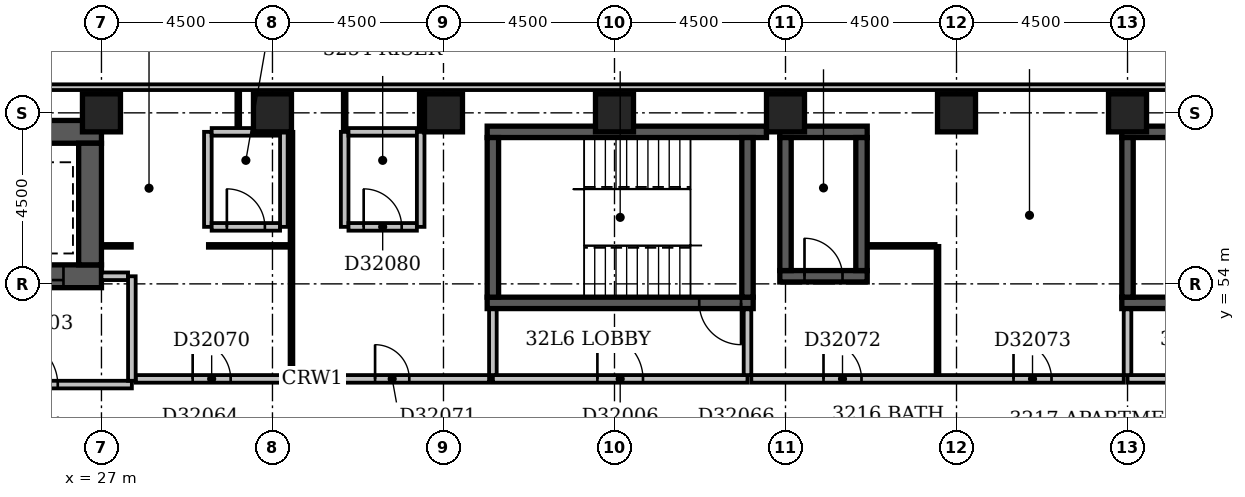
"""IFC4 building model, lengths in metres.
Left out: names, types, materials, properties, quantities, classifications, styles, units other than length and angle.
Written with IfcOpenShell. Run it as: python <this file> out.ifc"""

import sys

from ifc_helpers import new_model, si_unit, direction, frame, frame_2d, origin, origin_2d, place, context, subcontext, project, spatial, rectangle, extrude, element, fill, save


model = new_model("IFC4")
c1 = context("Model", 3, precision=1e-05, world=origin(), true_north=direction((0.0, 1.0)))
c2 = subcontext(c1, "Body", "Model", "MODEL_VIEW")
j1 = project(units=[si_unit("LENGTHUNIT", "METRE"), si_unit("PLANEANGLEUNIT", "RADIAN")], contexts=[c1])
p1 = place(None, origin())
s1 = spatial("IfcSite", under=j1, at=p1, CompositionType="ELEMENT")
p2 = place(p1, origin())
s2 = spatial("IfcBuilding", under=s1, at=p2, CompositionType="ELEMENT")
p3 = place(p2, frame((0.0, 0.0, 130.4)))
s3 = spatial("IfcBuildingStorey", under=s2, at=p3, CompositionType="ELEMENT", Elevation=130.4)
p4 = place(p3, frame((23.9, 54.2, -0.3), z_axis=(0.0, 0.0, 1.0), x_axis=(1.0, 0.0, 0.0)))
e1 = element("IfcWall", 1, at=p4, inside=s3, PredefinedType="SHEAR", context=c2, shape_type="SweptSolid", body=[
    extrude(rectangle(XDim=3.1, YDim=0.6, at=frame_2d((1.55, 0.0))), origin(), (0.0, 0.0, 1.0), 3.6),
])
p5 = place(p4, frame((1.0, 0.0, 0.3)))
e2 = element("IfcOpeningElement", 2, at=p5, cuts=e1, PredefinedType="OPENING", context=c2, shape_type="SweptSolid", body=[
    extrude(rectangle(XDim=1.1, YDim=2.1, at=frame_2d((0.55, 1.05))), frame((0.0, 0.312, 0.0), z_axis=(0.0, -1.0, 0.0), x_axis=(1.0, 0.0, 0.0)), (0.0, 0.0, 1.0), 0.624),
])
p6 = place(p3, frame((23.9, 58.0, -0.3), z_axis=(0.0, 0.0, 1.0), x_axis=(1.0, 0.0, 0.0)))
e3 = element("IfcWall", 3, at=p6, inside=s3, PredefinedType="SHEAR", context=c2, shape_type="SweptSolid", body=[
    extrude(rectangle(XDim=3.1, YDim=0.6, at=frame_2d((1.55, 0.0))), origin(), (0.0, 0.0, 1.0), 3.6),
])
p7 = place(p3, frame((26.7, 54.5, -0.3), z_axis=(0.0, 0.0, 1.0), x_axis=(0.0, 1.0, 0.0)))
e4 = element("IfcWall", 4, at=p7, inside=s3, PredefinedType="SHEAR", context=c2, shape_type="SweptSolid", body=[
    extrude(rectangle(XDim=3.2, YDim=0.6, at=frame_2d((1.6, 0.0))), origin(), (0.0, 0.0, 1.0), 3.6),
])
p8 = place(p3, frame((37.15, 53.5, -0.3), z_axis=(0.0, 0.0, 1.0), x_axis=(1.0, 0.0, 0.0)))
e5 = element("IfcWall", 5, at=p8, inside=s3, PredefinedType="SHEAR", context=c2, shape_type="SweptSolid", body=[
    extrude(rectangle(XDim=7.0, YDim=0.3, at=frame_2d((3.5, 0.0))), origin(), (0.0, 0.0, 1.0), 3.6),
])
p9 = place(p8, frame((5.58, 0.0, 0.3)))
e6 = element("IfcOpeningElement", 6, at=p9, cuts=e5, PredefinedType="OPENING", context=c2, shape_type="SweptSolid", body=[
    extrude(rectangle(XDim=1.1, YDim=2.1, at=frame_2d((0.55, 1.05))), frame((0.0, 0.162, 0.0), z_axis=(0.0, -1.0, 0.0), x_axis=(1.0, 0.0, 0.0)), (0.0, 0.0, 1.0), 0.324),
])
p10 = place(p3, frame((37.15, 58.0, -0.3), z_axis=(0.0, 0.0, 1.0), x_axis=(1.0, 0.0, 0.0)))
e7 = element("IfcWall", 7, at=p10, inside=s3, PredefinedType="SHEAR", context=c2, shape_type="SweptSolid", body=[
    extrude(rectangle(XDim=7.35, YDim=0.3, at=frame_2d((3.675, 0.0))), origin(), (0.0, 0.0, 1.0), 3.6),
])
for number, where, z_axis, x_axis in (
    (8, (37.3, 53.65, -0.3), (0.0, 0.0, 1.0), (0.0, 1.0, 0.0)),
    (9, (44.0, 53.65, -0.3), (0.0, 0.0, 1.0), (0.0, 1.0, 0.0)),
):
    element("IfcWall", number, at=place(p3, frame(where, z_axis=z_axis, x_axis=x_axis)), inside=s3, PredefinedType="SHEAR", context=c2, shape_type="SweptSolid", body=[
        extrude(rectangle(XDim=4.2, YDim=0.3, at=frame_2d((2.1, 0.0))), origin(), (0.0, 0.0, 1.0), 3.6),
    ])
p11 = place(p3, frame((44.85, 54.2, -0.3), z_axis=(0.0, 0.0, 1.0), x_axis=(1.0, 0.0, 0.0)))
e10 = element("IfcWall", 10, at=p11, inside=s3, PredefinedType="SHEAR", context=c2, shape_type="SweptSolid", body=[
    extrude(rectangle(XDim=2.3, YDim=0.3, at=frame_2d((1.15, 0.0))), origin(), (0.0, 0.0, 1.0), 3.6),
])
p12 = place(p11, frame((0.65, 0.0, 0.3)))
e11 = element("IfcOpeningElement", 11, at=p12, cuts=e10, PredefinedType="OPENING", context=c2, shape_type="SweptSolid", body=[
    extrude(rectangle(XDim=1.0, YDim=2.1, at=frame_2d((0.5, 1.05))), frame((0.0, 0.162, 0.0), z_axis=(0.0, -1.0, 0.0), x_axis=(1.0, 0.0, 0.0)), (0.0, 0.0, 1.0), 0.324),
])
p13 = place(p3, frame((44.85, 58.0, -0.3), z_axis=(0.0, 0.0, 1.0), x_axis=(1.0, 0.0, 0.0)))
e12 = element("IfcWall", 12, at=p13, inside=s3, PredefinedType="SHEAR", context=c2, shape_type="SweptSolid", body=[
    extrude(rectangle(XDim=2.3, YDim=0.3, at=frame_2d((1.15, 0.0))), origin(), (0.0, 0.0, 1.0), 3.6),
])
for number, where, z_axis, x_axis in (
    (13, (45.0, 54.35, -0.3), (0.0, 0.0, 1.0), (0.0, 1.0, 0.0)),
    (14, (47.0, 54.35, -0.3), (0.0, 0.0, 1.0), (0.0, 1.0, 0.0)),
):
    element("IfcWall", number, at=place(p3, frame(where, z_axis=z_axis, x_axis=x_axis)), inside=s3, PredefinedType="SHEAR", context=c2, shape_type="SweptSolid", body=[
        extrude(rectangle(XDim=3.5, YDim=0.3, at=frame_2d((1.75, 0.0))), origin(), (0.0, 0.0, 1.0), 3.6),
    ])
p14 = place(p3, frame((53.85, 53.5, -0.3), z_axis=(0.0, 0.0, 1.0), x_axis=(1.0, 0.0, 0.0)))
e15 = element("IfcWall", 15, at=p14, inside=s3, PredefinedType="SHEAR", context=c2, shape_type="SweptSolid", body=[
    extrude(rectangle(XDim=7.0, YDim=0.3, at=frame_2d((3.5, 0.0))), origin(), (0.0, 0.0, 1.0), 3.6),
])
p15 = place(p14, frame((5.58, 0.0, 0.3)))
e16 = element("IfcOpeningElement", 16, at=p15, cuts=e15, PredefinedType="OPENING", context=c2, shape_type="SweptSolid", body=[
    extrude(rectangle(XDim=1.1, YDim=2.1, at=frame_2d((0.55, 1.05))), frame((0.0, 0.162, 0.0), z_axis=(0.0, -1.0, 0.0), x_axis=(1.0, 0.0, 0.0)), (0.0, 0.0, 1.0), 0.324),
])
p16 = place(p3, frame((53.85, 58.0, -0.3), z_axis=(0.0, 0.0, 1.0), x_axis=(1.0, 0.0, 0.0)))
e17 = element("IfcWall", 17, at=p16, inside=s3, PredefinedType="SHEAR", context=c2, shape_type="SweptSolid", body=[
    extrude(rectangle(XDim=7.0, YDim=0.3, at=frame_2d((3.5, 0.0))), origin(), (0.0, 0.0, 1.0), 3.6),
])
p17 = place(p3, frame((54.0, 53.65, -0.3), z_axis=(0.0, 0.0, 1.0), x_axis=(0.0, 1.0, 0.0)))
e18 = element("IfcWall", 18, at=p17, inside=s3, PredefinedType="SHEAR", context=c2, shape_type="SweptSolid", body=[
    extrude(rectangle(XDim=4.2, YDim=0.3, at=frame_2d((2.1, 0.0))), origin(), (0.0, 0.0, 1.0), 3.6),
])
for number, where, z_axis, x_axis in (
    (19, (27.0, 58.5, -0.3), (0.0, 0.0, 1.0), (1.0, 0.0, 0.0)),
    (20, (31.5, 58.5, -0.3), (0.0, 0.0, 1.0), (1.0, 0.0, 0.0)),
    (21, (36.0, 58.5, -0.3), (0.0, 0.0, 1.0), (1.0, 0.0, 0.0)),
    (22, (40.5, 58.5, -0.3), (0.0, 0.0, 1.0), (1.0, 0.0, 0.0)),
    (23, (45.0, 58.5, -0.3), (0.0, 0.0, 1.0), (1.0, 0.0, 0.0)),
    (24, (49.5, 58.5, -0.3), (0.0, 0.0, 1.0), (1.0, 0.0, 0.0)),
    (25, (54.0, 58.5, -0.3), (0.0, 0.0, 1.0), (1.0, 0.0, 0.0)),
):
    element("IfcColumn", number, at=place(p3, frame(where, z_axis=z_axis, x_axis=x_axis)), inside=s3, PredefinedType="COLUMN", context=c2, shape_type="SweptSolid", body=[
        extrude(rectangle(XDim=1.0, YDim=1.0, at=origin_2d()), origin(), (0.0, 0.0, 1.0), 3.6),
    ])
p18 = place(p3, frame((68.1, 59.175, 0.0), z_axis=(0.0, 0.0, 1.0), x_axis=(-1.0, 0.0, 0.0)))
e26 = element("IfcWall", 26, at=p18, inside=s3, PredefinedType="STANDARD", context=c2, shape_type="SweptSolid", body=[
    extrude(rectangle(XDim=68.85, YDim=0.15, at=frame_2d((34.425, 0.0))), origin(), (0.0, 0.0, 1.0), 2.7),
])
p19 = place(p3, frame((23.0, 51.35, 0.0), z_axis=(0.0, 0.0, 1.0), x_axis=(1.0, 0.0, 0.0)))
e27 = element("IfcWall", 27, at=p19, inside=s3, PredefinedType="PARTITIONING", context=c2, shape_type="SweptSolid", body=[
    extrude(rectangle(XDim=4.8, YDim=0.2, at=frame_2d((2.4, 0.0))), origin(), (0.0, 0.0, 1.0), 3.3),
])
p20 = place(p19, frame((1.65, 0.0, 0.0)))
e28 = element("IfcOpeningElement", 28, at=p20, cuts=e27, PredefinedType="OPENING", context=c2, shape_type="SweptSolid", body=[
    extrude(rectangle(XDim=1.2, YDim=2.1, at=frame_2d((0.6, 1.05))), frame((0.0, 0.112, 0.0), z_axis=(0.0, -1.0, 0.0), x_axis=(1.0, 0.0, 0.0)), (0.0, 0.0, 1.0), 0.224),
])
p21 = place(p3, frame((27.8, 51.45, 0.0), z_axis=(0.0, 0.0, 1.0), x_axis=(0.0, 1.0, 0.0)))
e29 = element("IfcWall", 29, at=p21, inside=s3, PredefinedType="PARTITIONING", context=c2, shape_type="SweptSolid", body=[
    extrude(rectangle(XDim=2.75, YDim=0.2, at=frame_2d((1.375, 0.0))), origin(), (0.0, 0.0, 1.0), 3.3),
])
p22 = place(p3, frame((27.0, 54.2, 0.0), z_axis=(0.0, 0.0, 1.0), x_axis=(1.0, 0.0, 0.0)))
e30 = element("IfcWall", 30, at=p22, inside=s3, PredefinedType="PARTITIONING", context=c2, shape_type="SweptSolid", body=[
    extrude(rectangle(XDim=0.7, YDim=0.2, at=frame_2d((0.35, 0.0))), origin(), (0.0, 0.0, 1.0), 3.3),
])
p23 = place(p3, frame((37.3, 51.5, 0.0), z_axis=(0.0, 0.0, 1.0), x_axis=(1.0, 0.0, 0.0)))
e31 = element("IfcWall", 31, at=p23, inside=s3, PredefinedType="PARTITIONING", context=c2, shape_type="SweptSolid", body=[
    extrude(rectangle(XDim=6.7, YDim=0.2, at=frame_2d((3.35, 0.0))), origin(), (0.0, 0.0, 1.0), 3.3),
])
p24 = place(p23, frame((2.75, 0.0, 0.0)))
e32 = element("IfcOpeningElement", 32, at=p24, cuts=e31, PredefinedType="OPENING", context=c2, shape_type="SweptSolid", body=[
    extrude(rectangle(XDim=1.2, YDim=2.1, at=frame_2d((0.6, 1.05))), frame((0.0, 0.112, 0.0), z_axis=(0.0, -1.0, 0.0), x_axis=(1.0, 0.0, 0.0)), (0.0, 0.0, 1.0), 0.224),
])
for number, where, z_axis, x_axis in (
    (33, (44.0, 51.6, 0.0), (0.0, 0.0, 1.0), (0.0, 1.0, 0.0)),
    (34, (37.3, 51.6, 0.0), (0.0, 0.0, 1.0), (0.0, 1.0, 0.0)),
):
    element("IfcWall", number, at=place(p3, frame(where, z_axis=z_axis, x_axis=x_axis)), inside=s3, PredefinedType="PARTITIONING", context=c2, shape_type="SweptSolid", body=[
        extrude(rectangle(XDim=1.73, YDim=0.2, at=frame_2d((0.865, 0.0))), origin(), (0.0, 0.0, 1.0), 3.3),
    ])
p25 = place(p3, frame((54.0, 51.5, 0.0), z_axis=(0.0, 0.0, 1.0), x_axis=(1.0, 0.0, 0.0)))
e35 = element("IfcWall", 35, at=p25, inside=s3, PredefinedType="PARTITIONING", context=c2, shape_type="SweptSolid", body=[
    extrude(rectangle(XDim=6.7, YDim=0.2, at=frame_2d((3.35, 0.0))), origin(), (0.0, 0.0, 1.0), 3.3),
])
p26 = place(p25, frame((2.75, 0.0, 0.0)))
e36 = element("IfcOpeningElement", 36, at=p26, cuts=e35, PredefinedType="OPENING", context=c2, shape_type="SweptSolid", body=[
    extrude(rectangle(XDim=1.2, YDim=2.1, at=frame_2d((0.6, 1.05))), frame((0.0, 0.112, 0.0), z_axis=(0.0, -1.0, 0.0), x_axis=(1.0, 0.0, 0.0)), (0.0, 0.0, 1.0), 0.224),
])
p27 = place(p3, frame((54.0, 51.6, 0.0), z_axis=(0.0, 0.0, 1.0), x_axis=(0.0, 1.0, 0.0)))
e37 = element("IfcWall", 37, at=p27, inside=s3, PredefinedType="PARTITIONING", context=c2, shape_type="SweptSolid", body=[
    extrude(rectangle(XDim=1.73, YDim=0.2, at=frame_2d((0.865, 0.0))), origin(), (0.0, 0.0, 1.0), 2.6),
])
p28 = place(p3, frame((27.9, 51.5, 0.0), z_axis=(0.0, 0.0, 1.0), x_axis=(1.0, 0.0, 0.0)))
e38 = element("IfcWall", 38, at=p28, inside=s3, PredefinedType="PARTITIONING", context=c2, shape_type="SweptSolid", body=[
    extrude(rectangle(XDim=9.3, YDim=0.2, at=frame_2d((4.65, 0.0))), origin(), (0.0, 0.0, 1.0), 3.3),
])
p29 = place(p28, frame((1.5, 0.0, 0.0)))
e39 = element("IfcOpeningElement", 39, at=p29, cuts=e38, PredefinedType="OPENING", context=c2, shape_type="SweptSolid", body=[
    extrude(rectangle(XDim=1.0, YDim=2.1, at=frame_2d((0.5, 1.05))), frame((0.0, 0.112, 0.0), z_axis=(0.0, -1.0, 0.0), x_axis=(1.0, 0.0, 0.0)), (0.0, 0.0, 1.0), 0.224),
])
p30 = place(p28, frame((6.3, 0.0, 0.0)))
e40 = element("IfcOpeningElement", 40, at=p30, cuts=e38, PredefinedType="OPENING", context=c2, shape_type="SweptSolid", body=[
    extrude(rectangle(XDim=0.9, YDim=2.1, at=frame_2d((0.45, 1.05))), frame((0.0, 0.112, 0.0), z_axis=(0.0, -1.0, 0.0), x_axis=(1.0, 0.0, 0.0)), (0.0, 0.0, 1.0), 0.224),
])
p31 = place(p3, frame((44.1, 51.5, 0.0), z_axis=(0.0, 0.0, 1.0), x_axis=(1.0, 0.0, 0.0)))
e41 = element("IfcWall", 41, at=p31, inside=s3, PredefinedType="PARTITIONING", context=c2, shape_type="SweptSolid", body=[
    extrude(rectangle(XDim=9.8, YDim=0.2, at=frame_2d((4.9, 0.0))), origin(), (0.0, 0.0, 1.0), 3.3),
])
p32 = place(p31, frame((1.9, 0.0, 0.0)))
e42 = element("IfcOpeningElement", 42, at=p32, cuts=e41, PredefinedType="OPENING", context=c2, shape_type="SweptSolid", body=[
    extrude(rectangle(XDim=1.0, YDim=2.1, at=frame_2d((0.5, 1.05))), frame((0.0, 0.112, 0.0), z_axis=(0.0, -1.0, 0.0), x_axis=(1.0, 0.0, 0.0)), (0.0, 0.0, 1.0), 0.224),
])
p33 = place(p31, frame((6.9, 0.0, 0.0)))
e43 = element("IfcOpeningElement", 43, at=p33, cuts=e41, PredefinedType="OPENING", context=c2, shape_type="SweptSolid", body=[
    extrude(rectangle(XDim=1.0, YDim=2.1, at=frame_2d((0.5, 1.05))), frame((0.0, 0.112, 0.0), z_axis=(0.0, -1.0, 0.0), x_axis=(1.0, 0.0, 0.0)), (0.0, 0.0, 1.0), 0.224),
])
p34 = place(p3, frame((32.0, 51.6, 0.0), z_axis=(0.0, 0.0, 1.0), x_axis=(0.0, 1.0, 0.0)))
e44 = element("IfcWall", 44, at=p34, inside=s3, PredefinedType="PARTITIONING", context=c2, shape_type="SweptSolid", body=[
    extrude(rectangle(XDim=6.4, YDim=0.1, at=frame_2d((3.2, 0.0))), origin(), (0.0, 0.0, 1.0), 3.3),
])
p35 = place(p3, frame((49.0, 51.6, 0.0), z_axis=(0.0, 0.0, 1.0), x_axis=(0.0, 1.0, 0.0)))
e45 = element("IfcWall", 45, at=p35, inside=s3, PredefinedType="PARTITIONING", context=c2, shape_type="SweptSolid", body=[
    extrude(rectangle(XDim=3.4, YDim=0.1, at=frame_2d((1.7, 0.0))), origin(), (0.0, 0.0, 1.0), 3.3),
])
p36 = place(p3, frame((27.0, 55.0, 0.0), z_axis=(0.0, 0.0, 1.0), x_axis=(1.0, 0.0, 0.0)))
e46 = element("IfcWall", 46, at=p36, inside=s3, PredefinedType="PARTITIONING", context=c2, shape_type="SweptSolid", body=[
    extrude(rectangle(XDim=0.8, YDim=0.1, at=frame_2d((0.4, 0.0))), origin(), (0.0, 0.0, 1.0), 3.3),
])
p37 = place(p3, frame((29.8, 55.0, 0.0), z_axis=(0.0, 0.0, 1.0), x_axis=(1.0, 0.0, 0.0)))
e47 = element("IfcWall", 47, at=p37, inside=s3, PredefinedType="PARTITIONING", context=c2, shape_type="SweptSolid", body=[
    extrude(rectangle(XDim=2.15, YDim=0.1, at=frame_2d((1.075, 0.0))), origin(), (0.0, 0.0, 1.0), 3.3),
])
p38 = place(p3, frame((47.15, 55.0, 0.0), z_axis=(0.0, 0.0, 1.0), x_axis=(1.0, 0.0, 0.0)))
e48 = element("IfcWall", 48, at=p38, inside=s3, PredefinedType="PARTITIONING", context=c2, shape_type="SweptSolid", body=[
    extrude(rectangle(XDim=1.8, YDim=0.1, at=frame_2d((0.9, 0.0))), origin(), (0.0, 0.0, 1.0), 3.3),
])
p39 = place(p3, frame((29.8, 55.5, 0.0), z_axis=(0.0, 0.0, 1.0), x_axis=(0.0, 1.0, 0.0)))
e49 = element("IfcWall", 49, at=p39, inside=s3, PredefinedType="PARTITIONING", context=c2, shape_type="SweptSolid", body=[
    extrude(rectangle(XDim=2.5, YDim=0.2, at=frame_2d((1.25, 0.0))), origin(), (0.0, 0.0, 1.0), 3.3),
])
p40 = place(p3, frame((29.9, 55.5, 0.0), z_axis=(0.0, 0.0, 1.0), x_axis=(1.0, 0.0, 0.0)))
e50 = element("IfcWall", 50, at=p40, inside=s3, PredefinedType="PARTITIONING", context=c2, shape_type="SweptSolid", body=[
    extrude(rectangle(XDim=1.8, YDim=0.2, at=frame_2d((0.9, 0.0))), origin(), (0.0, 0.0, 1.0), 3.3),
])
p41 = place(p40, frame((0.4, 0.0, 0.0)))
e51 = element("IfcOpeningElement", 51, at=p41, cuts=e50, PredefinedType="OPENING", context=c2, shape_type="SweptSolid", body=[
    extrude(rectangle(XDim=1.0, YDim=2.1, at=frame_2d((0.5, 1.05))), frame((0.0, 0.112, 0.0), z_axis=(0.0, -1.0, 0.0), x_axis=(1.0, 0.0, 0.0)), (0.0, 0.0, 1.0), 0.224),
])
for number, where, z_axis, x_axis in (
    (52, (31.8, 55.5, 0.0), (0.0, 0.0, 1.0), (0.0, 1.0, 0.0)),
    (53, (33.4, 55.5, 0.0), (0.0, 0.0, 1.0), (0.0, 1.0, 0.0)),
):
    element("IfcWall", number, at=place(p3, frame(where, z_axis=z_axis, x_axis=x_axis)), inside=s3, PredefinedType="PARTITIONING", context=c2, shape_type="SweptSolid", body=[
        extrude(rectangle(XDim=2.5, YDim=0.2, at=frame_2d((1.25, 0.0))), origin(), (0.0, 0.0, 1.0), 3.3),
    ])
p42 = place(p3, frame((33.5, 55.5, 0.0), z_axis=(0.0, 0.0, 1.0), x_axis=(1.0, 0.0, 0.0)))
e54 = element("IfcWall", 54, at=p42, inside=s3, PredefinedType="PARTITIONING", context=c2, shape_type="SweptSolid", body=[
    extrude(rectangle(XDim=1.8, YDim=0.2, at=frame_2d((0.9, 0.0))), origin(), (0.0, 0.0, 1.0), 3.3),
])
p43 = place(p42, frame((0.4, 0.0, 0.0)))
e55 = element("IfcOpeningElement", 55, at=p43, cuts=e54, PredefinedType="OPENING", context=c2, shape_type="SweptSolid", body=[
    extrude(rectangle(XDim=1.0, YDim=2.1, at=frame_2d((0.5, 1.05))), frame((0.0, 0.112, 0.0), z_axis=(0.0, -1.0, 0.0), x_axis=(1.0, 0.0, 0.0)), (0.0, 0.0, 1.0), 0.224),
])
p44 = place(p3, frame((35.4, 55.5, 0.0), z_axis=(0.0, 0.0, 1.0), x_axis=(0.0, 1.0, 0.0)))
e56 = element("IfcWall", 56, at=p44, inside=s3, PredefinedType="PARTITIONING", context=c2, shape_type="SweptSolid", body=[
    extrude(rectangle(XDim=2.5, YDim=0.2, at=frame_2d((1.25, 0.0))), origin(), (0.0, 0.0, 1.0), 2.4),
])
p45 = place(p3, frame((29.9, 58.0, 0.0), z_axis=(0.0, 0.0, 1.0), x_axis=(1.0, 0.0, 0.0)))
e57 = element("IfcWall", 57, at=p45, inside=s3, PredefinedType="PARTITIONING", context=c2, shape_type="SweptSolid", body=[
    extrude(rectangle(XDim=1.8, YDim=0.2, at=frame_2d((0.9, 0.0))), origin(), (0.0, 0.0, 1.0), 3.3),
])
p46 = place(p3, frame((33.4, 58.0, 0.0), z_axis=(0.0, 0.0, 1.0), x_axis=(0.0, 1.0, 0.0)))
e58 = element("IfcWall", 58, at=p46, inside=s3, PredefinedType="PARTITIONING", context=c2, shape_type="SweptSolid", body=[
    extrude(rectangle(XDim=1.1, YDim=0.1, at=frame_2d((0.55, 0.0))), origin(), (0.0, 0.0, 1.0), 3.3),
])
p47 = place(p3, frame((33.5, 58.0, 0.0), z_axis=(0.0, 0.0, 1.0), x_axis=(1.0, 0.0, 0.0)))
e59 = element("IfcWall", 59, at=p47, inside=s3, PredefinedType="PARTITIONING", context=c2, shape_type="SweptSolid", body=[
    extrude(rectangle(XDim=1.8, YDim=0.2, at=frame_2d((0.9, 0.0))), origin(), (0.0, 0.0, 1.0), 3.3),
])
p48 = place(p3, frame((35.4, 58.0, 0.0), z_axis=(0.0, 0.0, 1.0), x_axis=(0.0, 1.0, 0.0)))
e60 = element("IfcWall", 60, at=p48, inside=s3, PredefinedType="PARTITIONING", context=c2, shape_type="SweptSolid", body=[
    extrude(rectangle(XDim=1.1, YDim=0.1, at=frame_2d((0.55, 0.0))), origin(), (0.0, 0.0, 1.0), 2.4),
])
p49 = place(p3, frame((30.6, 58.1, 0.0), z_axis=(0.0, 0.0, 1.0), x_axis=(0.0, 1.0, 0.0)))
e61 = element("IfcWall", 61, at=p49, inside=s3, PredefinedType="PARTITIONING", context=c2, shape_type="SweptSolid", body=[
    extrude(rectangle(XDim=1.0, YDim=0.1, at=frame_2d((0.5, 0.0))), origin(), (0.0, 0.0, 1.0), 3.3),
])
p50 = place(p20, origin())
e62 = element("IfcDoor", 62, at=p50, inside=s3, OperationType="SINGLE_SWING_LEFT", PredefinedType="DOOR", context=c2, shape_type="SweptSolid", body=[
    extrude(rectangle(XDim=1.2, YDim=2.1, at=frame_2d((0.6, 1.05))), frame((0.0, 0.025, 0.0), z_axis=(0.0, -1.0, 0.0), x_axis=(1.0, 0.0, 0.0)), (0.0, 0.0, 1.0), 0.05),
])
fill(e28, e62)
p51 = place(p5, origin())
e63 = element("IfcDoor", 63, at=p51, inside=s3, OperationType="SLIDING_TO_LEFT", PredefinedType="DOOR", context=c2, shape_type="SweptSolid", body=[
    extrude(rectangle(XDim=1.1, YDim=2.1, at=frame_2d((0.55, 1.05))), frame((0.0, 0.025, 0.0), z_axis=(0.0, -1.0, 0.0), x_axis=(1.0, 0.0, 0.0)), (0.0, 0.0, 1.0), 0.05),
])
fill(e2, e63)
p52 = place(p24, origin())
e64 = element("IfcDoor", 64, at=p52, inside=s3, OperationType="SINGLE_SWING_LEFT", PredefinedType="DOOR", context=c2, shape_type="SweptSolid", body=[
    extrude(rectangle(XDim=1.2, YDim=2.1, at=frame_2d((0.6, 1.05))), frame((0.0, 0.025, 0.0), z_axis=(0.0, -1.0, 0.0), x_axis=(1.0, 0.0, 0.0)), (0.0, 0.0, 1.0), 0.05),
])
fill(e32, e64)
p53 = place(p12, origin())
e65 = element("IfcDoor", 65, at=p53, inside=s3, OperationType="SINGLE_SWING_LEFT", PredefinedType="DOOR", context=c2, shape_type="SweptSolid", body=[
    extrude(rectangle(XDim=1.0, YDim=2.1, at=frame_2d((0.5, 1.05))), frame((0.0, 0.025, 0.0), z_axis=(0.0, -1.0, 0.0), x_axis=(1.0, 0.0, 0.0)), (0.0, 0.0, 1.0), 0.05),
])
fill(e11, e65)
p54 = place(p9, origin())
e66 = element("IfcDoor", 66, at=p54, inside=s3, OperationType="SINGLE_SWING_RIGHT", PredefinedType="DOOR", context=c2, shape_type="SweptSolid", body=[
    extrude(rectangle(XDim=1.1, YDim=2.1, at=frame_2d((0.55, 1.05))), frame((0.0, 0.025, 0.0), z_axis=(0.0, -1.0, 0.0), x_axis=(1.0, 0.0, 0.0)), (0.0, 0.0, 1.0), 0.05),
])
fill(e6, e66)
p55 = place(p29, origin())
e67 = element("IfcDoor", 67, at=p55, inside=s3, OperationType="SINGLE_SWING_LEFT", PredefinedType="DOOR", context=c2, shape_type="SweptSolid", body=[
    extrude(rectangle(XDim=1.0, YDim=2.1, at=frame_2d((0.5, 1.05))), frame((0.0, 0.025, 0.0), z_axis=(0.0, -1.0, 0.0), x_axis=(1.0, 0.0, 0.0)), (0.0, 0.0, 1.0), 0.05),
])
fill(e39, e67)
p56 = place(p30, origin())
e68 = element("IfcDoor", 68, at=p56, inside=s3, OperationType="SINGLE_SWING_LEFT", PredefinedType="DOOR", context=c2, shape_type="SweptSolid", body=[
    extrude(rectangle(XDim=0.9, YDim=2.1, at=frame_2d((0.45, 1.05))), frame((0.0, 0.025, 0.0), z_axis=(0.0, -1.0, 0.0), x_axis=(1.0, 0.0, 0.0)), (0.0, 0.0, 1.0), 0.05),
])
fill(e40, e68)
p57 = place(p32, origin())
e69 = element("IfcDoor", 69, at=p57, inside=s3, OperationType="SINGLE_SWING_LEFT", PredefinedType="DOOR", context=c2, shape_type="SweptSolid", body=[
    extrude(rectangle(XDim=1.0, YDim=2.1, at=frame_2d((0.5, 1.05))), frame((0.0, 0.025, 0.0), z_axis=(0.0, -1.0, 0.0), x_axis=(1.0, 0.0, 0.0)), (0.0, 0.0, 1.0), 0.05),
])
fill(e42, e69)
p58 = place(p33, origin())
e70 = element("IfcDoor", 70, at=p58, inside=s3, OperationType="SINGLE_SWING_LEFT", PredefinedType="DOOR", context=c2, shape_type="SweptSolid", body=[
    extrude(rectangle(XDim=1.0, YDim=2.1, at=frame_2d((0.5, 1.05))), frame((0.0, 0.025, 0.0), z_axis=(0.0, -1.0, 0.0), x_axis=(1.0, 0.0, 0.0)), (0.0, 0.0, 1.0), 0.05),
])
fill(e43, e70)
p59 = place(p41, origin())
e71 = element("IfcDoor", 71, at=p59, inside=s3, OperationType="SINGLE_SWING_LEFT", PredefinedType="DOOR", context=c2, shape_type="SweptSolid", body=[
    extrude(rectangle(XDim=1.0, YDim=2.1, at=frame_2d((0.5, 1.05))), frame((0.0, 0.025, 0.0), z_axis=(0.0, -1.0, 0.0), x_axis=(1.0, 0.0, 0.0)), (0.0, 0.0, 1.0), 0.05),
])
fill(e51, e71)
p60 = place(p43, origin())
e72 = element("IfcDoor", 72, at=p60, inside=s3, OperationType="SINGLE_SWING_LEFT", PredefinedType="DOOR", context=c2, shape_type="SweptSolid", body=[
    extrude(rectangle(XDim=1.0, YDim=2.1, at=frame_2d((0.5, 1.05))), frame((0.0, 0.025, 0.0), z_axis=(0.0, -1.0, 0.0), x_axis=(1.0, 0.0, 0.0)), (0.0, 0.0, 1.0), 0.05),
])
fill(e55, e72)
save(model, sys.argv[1])
